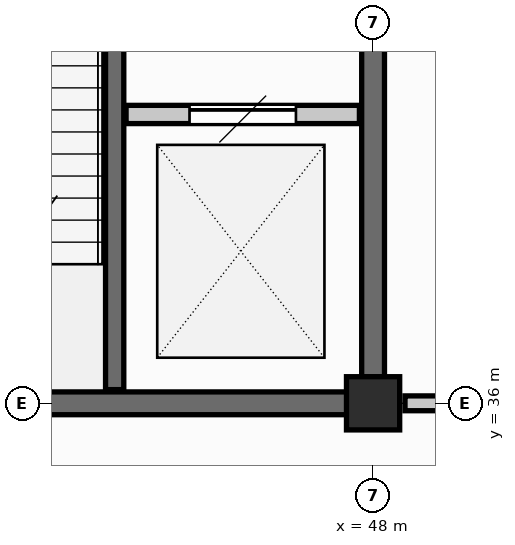
"""IFC4 building model, lengths in metres.
Left out: names, types, materials, properties, quantities, classifications, styles, units other than length and angle.
Written with IfcOpenShell. Run it as: python <this file> out.ifc"""

import sys

from ifc_helpers import new_model, si_unit, direction, frame, frame_2d, origin, origin_2d, place, context, subcontext, project, spatial, rectangle, extrude, element, fill, save


model = new_model("IFC4")
c1 = context("Model", 3, precision=1e-05, world=origin(), true_north=direction((0.0, 1.0)))
c2 = subcontext(c1, "Body", "Model", "MODEL_VIEW")
j1 = project(units=[si_unit("LENGTHUNIT", "METRE"), si_unit("PLANEANGLEUNIT", "RADIAN")], contexts=[c1])
p1 = place(None, origin())
s1 = spatial("IfcSite", under=j1, at=p1, CompositionType="ELEMENT")
p2 = place(p1, origin())
s2 = spatial("IfcBuilding", under=s1, at=p2, CompositionType="ELEMENT")
p3 = place(p2, origin())
s3 = spatial("IfcBuildingStorey", under=s2, at=p3, CompositionType="ELEMENT", Elevation=0.0)
p4 = place(p3, frame((48.0, 36.0, -1.25), z_axis=(0.0, 0.0, 1.0), x_axis=(1.0, 0.0, 0.0)))
e1 = element("IfcColumn", 1, at=p4, inside=s3, PredefinedType="COLUMN", context=c2, shape_type="SweptSolid", body=[
    extrude(rectangle(XDim=0.7, YDim=0.7, at=origin_2d()), origin(), (0.0, 0.0, 1.0), 6.05),
])
p5 = place(p3, frame((40.345, 36.0, -1.25), z_axis=(0.0, 0.0, 1.0), x_axis=(1.0, 0.0, 0.0)))
e2 = element("IfcWall", 2, at=p5, inside=s3, PredefinedType="SHEAR", context=c2, shape_type="SweptSolid", body=[
    extrude(rectangle(XDim=7.31, YDim=0.3, at=frame_2d((3.655, 0.0))), origin(), (0.0, 0.0, 1.0), 5.755),
])
p6 = place(p3, frame((48.0, 36.345, -1.25), z_axis=(0.0, 0.0, 1.0), x_axis=(0.0, 1.0, 0.0)))
e3 = element("IfcWall", 3, at=p6, inside=s3, PredefinedType="SHEAR", context=c2, shape_type="SweptSolid", body=[
    extrude(rectangle(XDim=8.31, YDim=0.3, at=frame_2d((4.155, 0.0))), origin(), (0.0, 0.0, 1.0), 5.755),
])
p7 = place(p3, frame((44.6, 36.18, -1.25), z_axis=(0.0, 0.0, 1.0), x_axis=(0.0, 1.0, 0.0)))
e4 = element("IfcWall", 4, at=p7, inside=s3, PredefinedType="SHEAR", context=c2, shape_type="SweptSolid", body=[
    extrude(rectangle(XDim=8.64, YDim=0.24, at=frame_2d((4.32, 0.0))), origin(), (0.0, 0.0, 1.0), 5.755),
])
p8 = place(p7, frame((6.02, 0.0, 1.25)))
e5 = element("IfcOpeningElement", 5, at=p8, cuts=e4, PredefinedType="OPENING", context=c2, shape_type="SweptSolid", body=[
    extrude(rectangle(XDim=1.38, YDim=2.22, at=frame_2d((0.69, 1.11))), frame((0.0, 0.13, 0.0), z_axis=(0.0, -1.0, 0.0), x_axis=(1.0, 0.0, 0.0)), (0.0, 0.0, 1.0), 0.26),
])
p9 = place(p7, frame((7.68, 0.0, 1.25)))
e6 = element("IfcOpeningElement", 6, at=p9, cuts=e4, PredefinedType="OPENING", context=c2, shape_type="SweptSolid", body=[
    extrude(rectangle(XDim=0.9, YDim=2.05, at=frame_2d((0.45, 1.025))), frame((0.0, 0.13, 0.0), z_axis=(0.0, -1.0, 0.0), x_axis=(1.0, 0.0, 0.0)), (0.0, 0.0, 1.0), 0.26),
])
p10 = place(p3, frame((44.75, 39.8, 0.0), z_axis=(0.0, 0.0, 1.0), x_axis=(1.0, 0.0, 0.0)))
e7 = element("IfcWall", 7, at=p10, inside=s3, PredefinedType="SHEAR", context=c2, shape_type="SweptSolid", body=[
    extrude(rectangle(XDim=3.07, YDim=0.24, at=frame_2d((1.535, 0.0))), origin(), (0.0, 0.0, 1.0), 3.855),
])
p11 = place(p10, frame((0.835, 0.0, 0.0)))
e8 = element("IfcOpeningElement", 8, at=p11, cuts=e7, PredefinedType="OPENING", context=c2, shape_type="SweptSolid", body=[
    extrude(rectangle(XDim=1.4, YDim=2.3, at=frame_2d((0.7, 1.15))), frame((0.0, 0.13, 0.0), z_axis=(0.0, -1.0, 0.0), x_axis=(1.0, 0.0, 0.0)), (0.0, 0.0, 1.0), 0.26),
])
p12 = place(p3, frame((48.42, 36.0, 0.0), z_axis=(0.0, 0.0, 1.0), x_axis=(1.0, 0.0, 0.0)))
e9 = element("IfcWall", 9, at=p12, inside=s3, PredefinedType="PARTITIONING", context=c2, shape_type="SweptSolid", body=[
    extrude(rectangle(XDim=7.16, YDim=0.195, at=frame_2d((3.58, 0.0))), origin(), (0.0, 0.0, 1.0), 3.55),
])
p13 = place(p12, frame((2.53, 0.0, 0.0)))
e10 = element("IfcOpeningElement", 10, at=p13, cuts=e9, PredefinedType="OPENING", context=c2, shape_type="SweptSolid", body=[
    extrude(rectangle(XDim=2.1, YDim=2.55, at=frame_2d((1.05, 1.275))), frame((0.0, 0.107, 0.0), z_axis=(0.0, -1.0, 0.0), x_axis=(1.0, 0.0, 0.0)), (0.0, 0.0, 1.0), 0.215),
])
p14 = place(p11, origin())
e11 = element("IfcDoor", 11, at=p14, inside=s3, OperationType="SLIDING_TO_LEFT", PredefinedType="DOOR", context=c2, shape_type="SweptSolid", body=[
    extrude(rectangle(XDim=1.4, YDim=2.3, at=frame_2d((0.7, 1.15))), frame((0.0, 0.025, 0.0), z_axis=(0.0, -1.0, 0.0), x_axis=(1.0, 0.0, 0.0)), (0.0, 0.0, 1.0), 0.05),
])
fill(e8, e11)
save(model, sys.argv[1])
